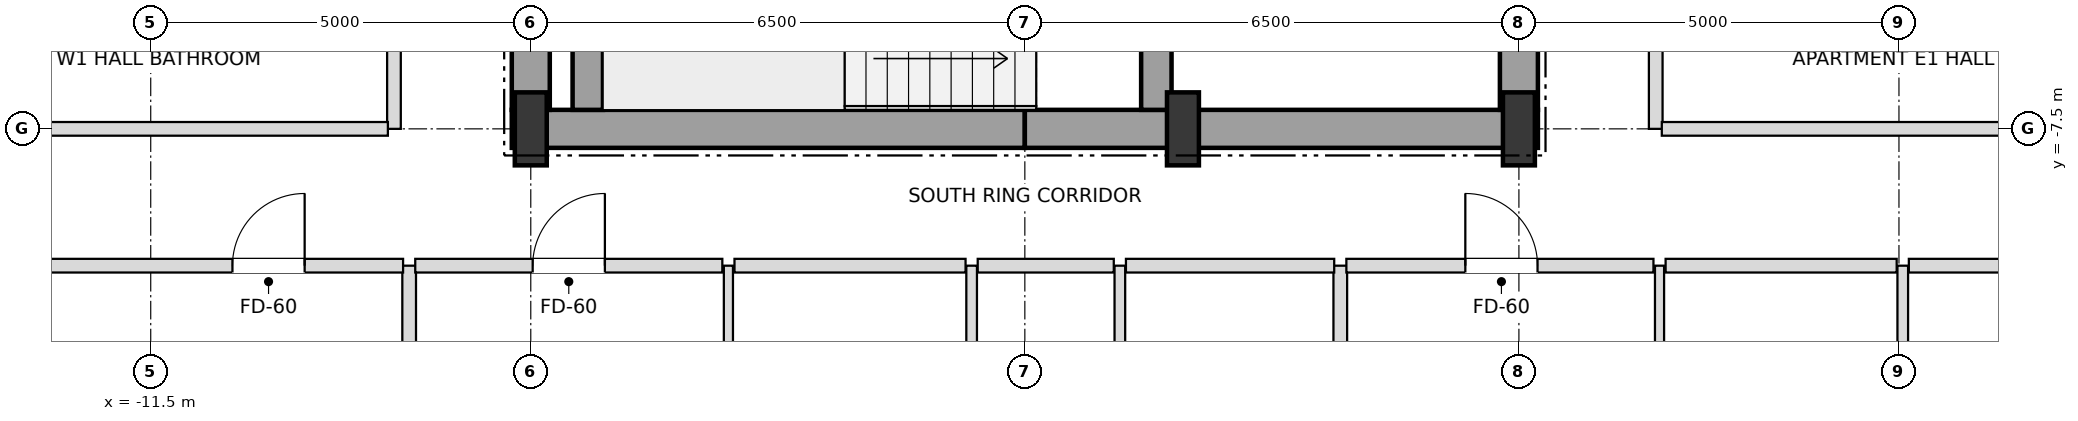
"""IFC4 building model, lengths in metres.
Left out: names, types, materials, properties, quantities, classifications, styles, units other than length and angle.
Written with IfcOpenShell. Run it as: python <this file> out.ifc"""

import sys

from ifc_helpers import new_model, si_unit, direction, frame, frame_2d, origin, origin_2d, place, context, subcontext, project, spatial, rectangle, i_section, extrude, element, fill, save


model = new_model("IFC4")
c1 = context("Model", 3, precision=1e-05, world=origin(), true_north=direction((0.0, 1.0)))
c2 = subcontext(c1, "Body", "Model", "MODEL_VIEW")
j1 = project(units=[si_unit("LENGTHUNIT", "METRE"), si_unit("PLANEANGLEUNIT", "RADIAN")], contexts=[c1])
p1 = place(None, origin())
s1 = spatial("IfcSite", under=j1, at=p1, CompositionType="ELEMENT")
p2 = place(p1, origin())
s2 = spatial("IfcBuilding", under=s1, at=p2, CompositionType="ELEMENT")
p3 = place(p2, frame((0.0, 0.0, 90.0)))
s3 = spatial("IfcBuildingStorey", under=s2, at=p3, CompositionType="ELEMENT", Elevation=90.0)
for number, where, z_axis, x_axis in (
    (1, (-6.5, -7.5, 0.0), (0.0, 0.0, 1.0), (1.0, 0.0, 0.0)),
    (2, (2.08, -7.5, 0.0), (0.0, 0.0, 1.0), (1.0, 0.0, 0.0)),
    (3, (6.5, -7.5, 0.0), (0.0, 0.0, 1.0), (1.0, 0.0, 0.0)),
):
    element("IfcColumn", number, at=place(p3, frame(where, z_axis=z_axis, x_axis=x_axis)), inside=s3, PredefinedType="COLUMN", context=c2, shape_type="SweptSolid", body=[
        extrude(i_section(OverallWidth=0.42, OverallDepth=0.96, WebThickness=0.022, FlangeThickness=0.034, at=origin_2d()), origin(), (0.0, 0.0, 1.0), 3.6),
    ])
for number, where, z_axis, x_axis in (
    (4, (-6.75, -7.5, 0.0), (0.0, 0.0, 1.0), (1.0, 0.0, 0.0)),
    (5, (0.0, -7.5, 0.0), (0.0, 0.0, 1.0), (1.0, 0.0, 0.0)),
):
    element("IfcWall", number, at=place(p3, frame(where, z_axis=z_axis, x_axis=x_axis)), inside=s3, PredefinedType="SHEAR", context=c2, shape_type="SweptSolid", body=[
        extrude(rectangle(XDim=6.75, YDim=0.5, at=frame_2d((3.375, 0.0))), origin(), (0.0, 0.0, 1.0), 3.3),
    ])
p4 = place(p3, frame((-6.5, -7.25, 0.0), z_axis=(0.0, 0.0, 1.0), x_axis=(0.0, 1.0, 0.0)))
e6 = element("IfcWall", 6, at=p4, inside=s3, PredefinedType="SHEAR", context=c2, shape_type="SweptSolid", body=[
    extrude(rectangle(XDim=3.55, YDim=0.5, at=frame_2d((1.775, 0.0))), origin(), (0.0, 0.0, 1.0), 3.3),
])
p5 = place(p3, frame((6.5, -7.25, 0.0), z_axis=(0.0, 0.0, 1.0), x_axis=(0.0, 1.0, 0.0)))
e7 = element("IfcWall", 7, at=p5, inside=s3, PredefinedType="SHEAR", context=c2, shape_type="SweptSolid", body=[
    extrude(rectangle(XDim=5.75, YDim=0.5, at=frame_2d((2.875, 0.0))), origin(), (0.0, 0.0, 1.0), 3.3),
])
p6 = place(p5, frame((0.85, 0.0, 0.0)))
e8 = element("IfcOpeningElement", 8, at=p6, cuts=e7, PredefinedType="OPENING", context=c2, shape_type="SweptSolid", body=[
    extrude(rectangle(XDim=1.05, YDim=2.15, at=frame_2d((0.525, 1.075))), frame((0.0, 0.26, 0.0), z_axis=(0.0, -1.0, 0.0), x_axis=(1.0, 0.0, 0.0)), (0.0, 0.0, 1.0), 0.52),
])
p7 = place(p3, frame((-5.75, -7.25, 0.0), z_axis=(0.0, 0.0, 1.0), x_axis=(0.0, 1.0, 0.0)))
e9 = element("IfcWall", 9, at=p7, inside=s3, PredefinedType="SHEAR", context=c2, shape_type="SweptSolid", body=[
    extrude(rectangle(XDim=2.9, YDim=0.4, at=frame_2d((1.45, 0.0))), origin(), (0.0, 0.0, 1.0), 3.3),
])
p8 = place(p3, frame((1.73, -7.25, 0.0), z_axis=(0.0, 0.0, 1.0), x_axis=(0.0, 1.0, 0.0)))
e10 = element("IfcWall", 10, at=p8, inside=s3, PredefinedType="SHEAR", context=c2, shape_type="SweptSolid", body=[
    extrude(rectangle(XDim=3.3, YDim=0.4, at=frame_2d((1.65, 0.0))), origin(), (0.0, 0.0, 1.0), 3.3),
])
p9 = place(p8, frame((0.9, 0.0, 0.0)))
e11 = element("IfcOpeningElement", 11, at=p9, cuts=e10, PredefinedType="OPENING", context=c2, shape_type="SweptSolid", body=[
    extrude(rectangle(XDim=1.05, YDim=2.15, at=frame_2d((0.525, 1.075))), frame((0.0, 0.21, 0.0), z_axis=(0.0, -1.0, 0.0), x_axis=(1.0, 0.0, 0.0)), (0.0, 0.0, 1.0), 0.42),
])
p10 = place(p3, frame((-8.3, -7.5, 0.0), z_axis=(0.0, 0.0, 1.0), x_axis=(0.0, 1.0, 0.0)))
e12 = element("IfcWall", 12, at=p10, inside=s3, PredefinedType="PARTITIONING", context=c2, shape_type="SweptSolid", body=[
    extrude(rectangle(XDim=15.0, YDim=0.18, at=frame_2d((7.5, 0.0))), origin(), (0.0, 0.0, 1.0), 3.3),
])
p11 = place(p10, frame((2.965, 0.0, 0.0)))
e13 = element("IfcOpeningElement", 13, at=p11, cuts=e12, PredefinedType="OPENING", context=c2, shape_type="SweptSolid", body=[
    extrude(rectangle(XDim=0.95, YDim=2.15, at=frame_2d((0.475, 1.075))), frame((0.0, 0.1, 0.0), z_axis=(0.0, -1.0, 0.0), x_axis=(1.0, 0.0, 0.0)), (0.0, 0.0, 1.0), 0.2),
])
p12 = place(p10, frame((10.465, 0.0, 0.0)))
e14 = element("IfcOpeningElement", 14, at=p12, cuts=e12, PredefinedType="OPENING", context=c2, shape_type="SweptSolid", body=[
    extrude(rectangle(XDim=0.95, YDim=2.15, at=frame_2d((0.475, 1.075))), frame((0.0, 0.1, 0.0), z_axis=(0.0, -1.0, 0.0), x_axis=(1.0, 0.0, 0.0)), (0.0, 0.0, 1.0), 0.2),
])
p13 = place(p3, frame((-8.1, -24.9, 0.0), z_axis=(0.0, 0.0, 1.0), x_axis=(0.0, 1.0, 0.0)))
e15 = element("IfcWall", 15, at=p13, inside=s3, PredefinedType="PARTITIONING", context=c2, shape_type="SweptSolid", body=[
    extrude(rectangle(XDim=15.6, YDim=0.18, at=frame_2d((7.8, 0.0))), origin(), (0.0, 0.0, 1.0), 2.736),
])
p14 = place(p3, frame((-3.9, -24.9, 0.0), z_axis=(0.0, 0.0, 1.0), x_axis=(0.0, 1.0, 0.0)))
e16 = element("IfcWall", 16, at=p14, inside=s3, PredefinedType="PARTITIONING", context=c2, shape_type="SweptSolid", body=[
    extrude(rectangle(XDim=15.6, YDim=0.12, at=frame_2d((7.8, 0.0))), origin(), (0.0, 0.0, 1.0), 2.736),
])
p15 = place(p14, frame((10.325, 0.0, 0.0)))
e17 = element("IfcOpeningElement", 17, at=p15, cuts=e16, PredefinedType="OPENING", context=c2, shape_type="SweptSolid", body=[
    extrude(rectangle(XDim=0.95, YDim=2.1, at=frame_2d((0.475, 1.05))), frame((0.0, 0.07, 0.0), z_axis=(0.0, -1.0, 0.0), x_axis=(1.0, 0.0, 0.0)), (0.0, 0.0, 1.0), 0.14),
])
p16 = place(p14, frame((2.55, 0.0, 0.0)))
e18 = element("IfcOpeningElement", 18, at=p16, cuts=e16, PredefinedType="OPENING", context=c2, shape_type="SweptSolid", body=[
    extrude(rectangle(XDim=0.9, YDim=2.1, at=frame_2d((0.45, 1.05))), frame((0.0, 0.07, 0.0), z_axis=(0.0, -1.0, 0.0), x_axis=(1.0, 0.0, 0.0)), (0.0, 0.0, 1.0), 0.14),
])
p17 = place(p3, frame((-0.7, -24.9, 0.0), z_axis=(0.0, 0.0, 1.0), x_axis=(0.0, 1.0, 0.0)))
e19 = element("IfcWall", 19, at=p17, inside=s3, PredefinedType="PARTITIONING", context=c2, shape_type="SweptSolid", body=[
    extrude(rectangle(XDim=15.6, YDim=0.14, at=frame_2d((7.8, 0.0))), origin(), (0.0, 0.0, 1.0), 2.736),
])
p18 = place(p17, frame((10.35, 0.0, 0.0)))
e20 = element("IfcOpeningElement", 20, at=p18, cuts=e19, PredefinedType="OPENING", context=c2, shape_type="SweptSolid", body=[
    extrude(rectangle(XDim=0.9, YDim=2.1, at=frame_2d((0.45, 1.05))), frame((0.0, 0.08, 0.0), z_axis=(0.0, -1.0, 0.0), x_axis=(1.0, 0.0, 0.0)), (0.0, 0.0, 1.0), 0.16),
])
p19 = place(p17, frame((2.55, 0.0, 0.0)))
e21 = element("IfcOpeningElement", 21, at=p19, cuts=e19, PredefinedType="OPENING", context=c2, shape_type="SweptSolid", body=[
    extrude(rectangle(XDim=0.9, YDim=2.1, at=frame_2d((0.45, 1.05))), frame((0.0, 0.08, 0.0), z_axis=(0.0, -1.0, 0.0), x_axis=(1.0, 0.0, 0.0)), (0.0, 0.0, 1.0), 0.16),
])
p20 = place(p3, frame((1.25, -18.9, 0.0), z_axis=(0.0, 0.0, 1.0), x_axis=(0.0, 1.0, 0.0)))
e22 = element("IfcWall", 22, at=p20, inside=s3, PredefinedType="PARTITIONING", context=c2, shape_type="SweptSolid", body=[
    extrude(rectangle(XDim=9.6, YDim=0.14, at=frame_2d((4.8, 0.0))), origin(), (0.0, 0.0, 1.0), 2.868),
])
p21 = place(p3, frame((4.15, -24.9, 0.0), z_axis=(0.0, 0.0, 1.0), x_axis=(0.0, 1.0, 0.0)))
e23 = element("IfcWall", 23, at=p21, inside=s3, PredefinedType="PARTITIONING", context=c2, shape_type="SweptSolid", body=[
    extrude(rectangle(XDim=15.6, YDim=0.18, at=frame_2d((7.8, 0.0))), origin(), (0.0, 0.0, 1.0), 2.736),
])
p22 = place(p3, frame((8.3, -7.5, 0.0), z_axis=(0.0, 0.0, 1.0), x_axis=(0.0, 1.0, 0.0)))
e24 = element("IfcWall", 24, at=p22, inside=s3, PredefinedType="PARTITIONING", context=c2, shape_type="SweptSolid", body=[
    extrude(rectangle(XDim=15.0, YDim=0.18, at=frame_2d((7.5, 0.0))), origin(), (0.0, 0.0, 1.0), 3.3),
])
p23 = place(p22, frame((2.995, 0.0, 0.0)))
e25 = element("IfcOpeningElement", 25, at=p23, cuts=e24, PredefinedType="OPENING", context=c2, shape_type="SweptSolid", body=[
    extrude(rectangle(XDim=0.95, YDim=2.15, at=frame_2d((0.475, 1.075))), frame((0.0, 0.1, 0.0), z_axis=(0.0, -1.0, 0.0), x_axis=(1.0, 0.0, 0.0)), (0.0, 0.0, 1.0), 0.2),
])
p24 = place(p22, frame((10.495, 0.0, 0.0)))
e26 = element("IfcOpeningElement", 26, at=p24, cuts=e24, PredefinedType="OPENING", context=c2, shape_type="SweptSolid", body=[
    extrude(rectangle(XDim=0.95, YDim=2.15, at=frame_2d((0.475, 1.075))), frame((0.0, 0.1, 0.0), z_axis=(0.0, -1.0, 0.0), x_axis=(1.0, 0.0, 0.0)), (0.0, 0.0, 1.0), 0.2),
])
p25 = place(p3, frame((8.35, -18.9, 0.0), z_axis=(0.0, 0.0, 1.0), x_axis=(0.0, 1.0, 0.0)))
e27 = element("IfcWall", 27, at=p25, inside=s3, PredefinedType="PARTITIONING", context=c2, shape_type="SweptSolid", body=[
    extrude(rectangle(XDim=9.6, YDim=0.12, at=frame_2d((4.8, 0.0))), origin(), (0.0, 0.0, 1.0), 2.736),
])
p26 = place(p25, frame((4.325, 0.0, 0.0)))
e28 = element("IfcOpeningElement", 28, at=p26, cuts=e27, PredefinedType="OPENING", context=c2, shape_type="SweptSolid", body=[
    extrude(rectangle(XDim=0.95, YDim=2.1, at=frame_2d((0.475, 1.05))), frame((0.0, 0.07, 0.0), z_axis=(0.0, -1.0, 0.0), x_axis=(1.0, 0.0, 0.0)), (0.0, 0.0, 1.0), 0.14),
])
p27 = place(p3, frame((11.55, -18.9, 0.0), z_axis=(0.0, 0.0, 1.0), x_axis=(0.0, 1.0, 0.0)))
e29 = element("IfcWall", 29, at=p27, inside=s3, PredefinedType="PARTITIONING", context=c2, shape_type="SweptSolid", body=[
    extrude(rectangle(XDim=9.6, YDim=0.14, at=frame_2d((4.8, 0.0))), origin(), (0.0, 0.0, 1.0), 2.59),
])
p28 = place(p27, frame((4.35, 0.0, 0.0)))
e30 = element("IfcOpeningElement", 30, at=p28, cuts=e29, PredefinedType="OPENING", context=c2, shape_type="SweptSolid", body=[
    extrude(rectangle(XDim=0.9, YDim=2.1, at=frame_2d((0.45, 1.05))), frame((0.0, 0.08, 0.0), z_axis=(0.0, -1.0, 0.0), x_axis=(1.0, 0.0, 0.0)), (0.0, 0.0, 1.0), 0.16),
])
p29 = place(p3, frame((-13.67, -9.3, 0.0), z_axis=(0.0, 0.0, 1.0), x_axis=(1.0, 0.0, 0.0)))
e31 = element("IfcWall", 31, at=p29, inside=s3, PredefinedType="PARTITIONING", context=c2, shape_type="SweptSolid", body=[
    extrude(rectangle(XDim=5.49, YDim=0.18, at=frame_2d((2.745, 0.0))), origin(), (0.0, 0.0, 1.0), 3.3),
])
p30 = place(p29, frame((3.245, 0.0, 0.0)))
e32 = element("IfcOpeningElement", 32, at=p30, cuts=e31, PredefinedType="OPENING", context=c2, shape_type="SweptSolid", body=[
    extrude(rectangle(XDim=0.95, YDim=2.15, at=frame_2d((0.475, 1.075))), frame((0.0, 0.1, 0.0), z_axis=(0.0, -1.0, 0.0), x_axis=(1.0, 0.0, 0.0)), (0.0, 0.0, 1.0), 0.2),
])
p31 = place(p3, frame((-8.02, -9.3, 0.0), z_axis=(0.0, 0.0, 1.0), x_axis=(1.0, 0.0, 0.0)))
e33 = element("IfcWall", 33, at=p31, inside=s3, PredefinedType="PARTITIONING", context=c2, shape_type="SweptSolid", body=[
    extrude(rectangle(XDim=4.04, YDim=0.18, at=frame_2d((2.02, 0.0))), origin(), (0.0, 0.0, 1.0), 2.736),
])
p32 = place(p31, frame((1.545, 0.0, 0.0)))
e34 = element("IfcOpeningElement", 34, at=p32, cuts=e33, PredefinedType="OPENING", context=c2, shape_type="SweptSolid", body=[
    extrude(rectangle(XDim=0.95, YDim=2.15, at=frame_2d((0.475, 1.075))), frame((0.0, 0.1, 0.0), z_axis=(0.0, -1.0, 0.0), x_axis=(1.0, 0.0, 0.0)), (0.0, 0.0, 1.0), 0.2),
])
p33 = place(p3, frame((-3.82, -9.3, 0.0), z_axis=(0.0, 0.0, 1.0), x_axis=(1.0, 0.0, 0.0)))
e35 = element("IfcWall", 35, at=p33, inside=s3, PredefinedType="PARTITIONING", context=c2, shape_type="SweptSolid", body=[
    extrude(rectangle(XDim=3.04, YDim=0.18, at=frame_2d((1.52, 0.0))), origin(), (0.0, 0.0, 1.0), 3.3),
])
p34 = place(p3, frame((-0.62, -9.3, 0.0), z_axis=(0.0, 0.0, 1.0), x_axis=(1.0, 0.0, 0.0)))
e36 = element("IfcWall", 36, at=p34, inside=s3, PredefinedType="PARTITIONING", context=c2, shape_type="SweptSolid", body=[
    extrude(rectangle(XDim=1.79, YDim=0.18, at=frame_2d((0.895, 0.0))), origin(), (0.0, 0.0, 1.0), 3.3),
])
p35 = place(p3, frame((1.33, -9.3, 0.0), z_axis=(0.0, 0.0, 1.0), x_axis=(1.0, 0.0, 0.0)))
e37 = element("IfcWall", 37, at=p35, inside=s3, PredefinedType="PARTITIONING", context=c2, shape_type="SweptSolid", body=[
    extrude(rectangle(XDim=2.74, YDim=0.18, at=frame_2d((1.37, 0.0))), origin(), (0.0, 0.0, 1.0), 3.3),
])
p36 = place(p3, frame((4.23, -9.3, 0.0), z_axis=(0.0, 0.0, 1.0), x_axis=(1.0, 0.0, 0.0)))
e38 = element("IfcWall", 38, at=p36, inside=s3, PredefinedType="PARTITIONING", context=c2, shape_type="SweptSolid", body=[
    extrude(rectangle(XDim=4.04, YDim=0.18, at=frame_2d((2.02, 0.0))), origin(), (0.0, 0.0, 1.0), 2.736),
])
p37 = place(p36, frame((1.565, 0.0, 0.0)))
e39 = element("IfcOpeningElement", 39, at=p37, cuts=e38, PredefinedType="OPENING", context=c2, shape_type="SweptSolid", body=[
    extrude(rectangle(XDim=0.95, YDim=2.15, at=frame_2d((0.475, 1.075))), frame((0.0, 0.1, 0.0), z_axis=(0.0, -1.0, 0.0), x_axis=(1.0, 0.0, 0.0)), (0.0, 0.0, 1.0), 0.2),
])
p38 = place(p3, frame((8.43, -9.3, 0.0), z_axis=(0.0, 0.0, 1.0), x_axis=(1.0, 0.0, 0.0)))
e40 = element("IfcWall", 40, at=p38, inside=s3, PredefinedType="PARTITIONING", context=c2, shape_type="SweptSolid", body=[
    extrude(rectangle(XDim=3.04, YDim=0.18, at=frame_2d((1.52, 0.0))), origin(), (0.0, 0.0, 1.0), 3.3),
])
p39 = place(p3, frame((11.63, -9.3, 0.0), z_axis=(0.0, 0.0, 1.0), x_axis=(1.0, 0.0, 0.0)))
e41 = element("IfcWall", 41, at=p39, inside=s3, PredefinedType="PARTITIONING", context=c2, shape_type="SweptSolid", body=[
    extrude(rectangle(XDim=1.79, YDim=0.18, at=frame_2d((0.895, 0.0))), origin(), (0.0, 0.0, 1.0), 3.3),
])
for number, where, z_axis, x_axis in (
    (42, (-16.02, -7.5, 0.0), (0.0, 0.0, 1.0), (1.0, 0.0, 0.0)),
    (43, (8.38, -7.5, 0.0), (0.0, 0.0, 1.0), (1.0, 0.0, 0.0)),
):
    element("IfcWall", number, at=place(p3, frame(where, z_axis=z_axis, x_axis=x_axis)), inside=s3, PredefinedType="PARTITIONING", context=c2, shape_type="SweptSolid", body=[
        extrude(rectangle(XDim=7.64, YDim=0.18, at=frame_2d((3.82, 0.0))), origin(), (0.0, 0.0, 1.0), 2.736),
    ])
p40 = place(p30, origin())
e44 = element("IfcDoor", 44, at=p40, inside=s3, OperationType="SINGLE_SWING_RIGHT", PredefinedType="DOOR", context=c2, shape_type="SweptSolid", body=[
    extrude(rectangle(XDim=0.95, YDim=2.15, at=frame_2d((0.475, 1.075))), frame((0.0, 0.025, 0.0), z_axis=(0.0, -1.0, 0.0), x_axis=(1.0, 0.0, 0.0)), (0.0, 0.0, 1.0), 0.05),
])
fill(e32, e44)
p41 = place(p32, origin())
e45 = element("IfcDoor", 45, at=p41, inside=s3, OperationType="SINGLE_SWING_RIGHT", PredefinedType="DOOR", context=c2, shape_type="SweptSolid", body=[
    extrude(rectangle(XDim=0.95, YDim=2.15, at=frame_2d((0.475, 1.075))), frame((0.0, 0.025, 0.0), z_axis=(0.0, -1.0, 0.0), x_axis=(1.0, 0.0, 0.0)), (0.0, 0.0, 1.0), 0.05),
])
fill(e34, e45)
p42 = place(p37, origin())
e46 = element("IfcDoor", 46, at=p42, inside=s3, OperationType="SINGLE_SWING_LEFT", PredefinedType="DOOR", context=c2, shape_type="SweptSolid", body=[
    extrude(rectangle(XDim=0.95, YDim=2.15, at=frame_2d((0.475, 1.075))), frame((0.0, 0.025, 0.0), z_axis=(0.0, -1.0, 0.0), x_axis=(1.0, 0.0, 0.0)), (0.0, 0.0, 1.0), 0.05),
])
fill(e39, e46)
save(model, sys.argv[1])
